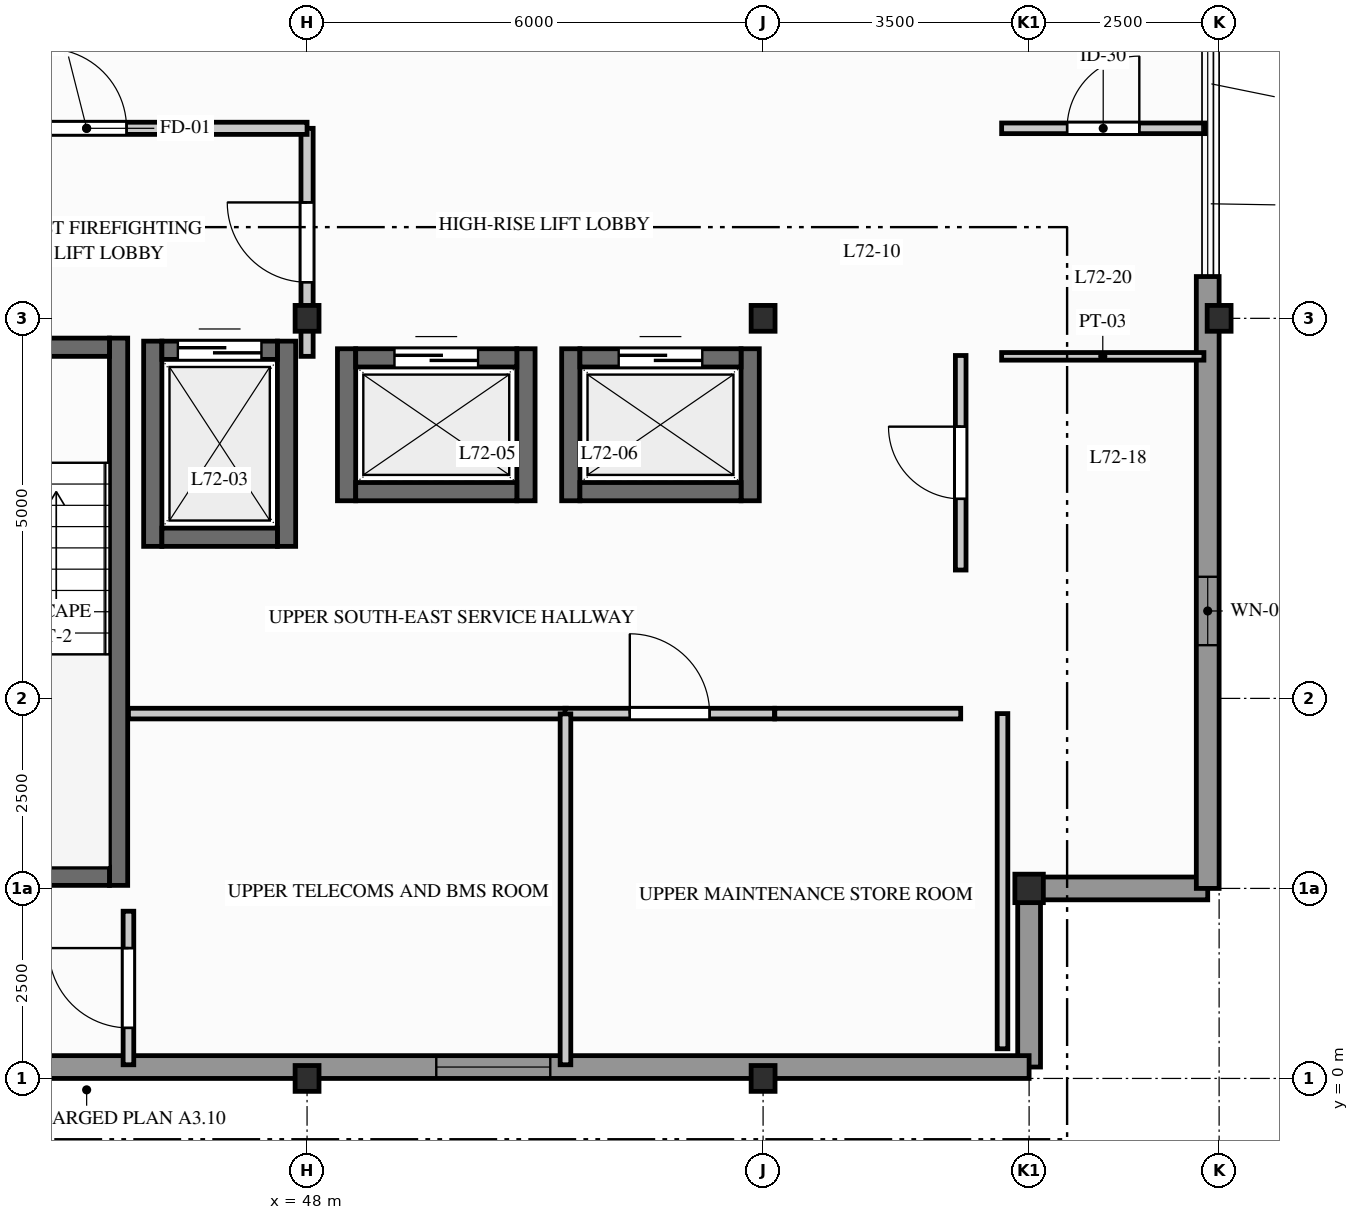
"""IFC4 building model, lengths in metres.
Left out: names, types, materials, properties, quantities, classifications, styles, units other than length and angle.
Written with IfcOpenShell. Run it as: python <this file> out.ifc"""

import sys

from ifc_helpers import new_model, si_unit, direction, frame, frame_2d, origin, origin_2d, place, context, subcontext, project, spatial, rectangle, i_section, extrude, element, fill, save


model = new_model("IFC4")
c1 = context("Model", 3, precision=1e-05, world=origin(), true_north=direction((0.0, 1.0)))
c2 = subcontext(c1, "Body", "Model", "MODEL_VIEW")
j1 = project(units=[si_unit("LENGTHUNIT", "METRE"), si_unit("PLANEANGLEUNIT", "RADIAN")], contexts=[c1])
p1 = place(None, origin())
s1 = spatial("IfcSite", under=j1, at=p1, CompositionType="ELEMENT")
p2 = place(p1, origin())
s2 = spatial("IfcBuilding", under=s1, at=p2, CompositionType="ELEMENT")
p3 = place(p2, frame((0.0, 0.0, 236.6)))
s3 = spatial("IfcBuildingStorey", under=s2, at=p3, CompositionType="ELEMENT", Elevation=236.6)
for number, where, z_axis, x_axis in (
    (1, (48.0, 0.0, 0.0), (0.0, 0.0, 1.0), (1.0, 0.0, 0.0)),
    (2, (48.0, 10.0, 0.0), (0.0, 0.0, 1.0), (1.0, 0.0, 0.0)),
    (3, (54.0, 0.0, 0.0), (0.0, 0.0, 1.0), (1.0, 0.0, 0.0)),
    (4, (54.0, 10.0, 0.0), (0.0, 0.0, 1.0), (1.0, 0.0, 0.0)),
):
    element("IfcColumn", number, at=place(p3, frame(where, z_axis=z_axis, x_axis=x_axis)), inside=s3, PredefinedType="COLUMN", context=c2, shape_type="SweptSolid", body=[
        extrude(i_section(OverallWidth=0.314, OverallDepth=0.34, WebThickness=0.019, FlangeThickness=0.031, FilletRadius=0.015, at=origin_2d()), origin(), (0.0, 0.0, 1.0), 3.45),
    ])
p4 = place(p3, frame((57.5, 2.5, 0.0), z_axis=(0.0, 0.0, 1.0), x_axis=(1.0, 0.0, 0.0)))
e5 = element("IfcColumn", 5, at=p4, inside=s3, PredefinedType="COLUMN", context=c2, shape_type="SweptSolid", body=[
    extrude(i_section(OverallWidth=0.375, OverallDepth=0.375, WebThickness=0.017, FlangeThickness=0.027, FilletRadius=0.015, at=origin_2d()), origin(), (0.0, 0.0, 1.0), 3.45),
])
p5 = place(p3, frame((60.0, 10.0, 0.0), z_axis=(0.0, 0.0, 1.0), x_axis=(1.0, 0.0, 0.0)))
e6 = element("IfcColumn", 6, at=p5, inside=s3, PredefinedType="COLUMN", context=c2, shape_type="SweptSolid", body=[
    extrude(i_section(OverallWidth=0.314, OverallDepth=0.34, WebThickness=0.019, FlangeThickness=0.031, FilletRadius=0.015, at=origin_2d()), origin(), (0.0, 0.0, 1.0), 3.45),
])
for number, where, z_axis, x_axis in (
    (7, (57.5, 0.15, 0.0), (0.0, 0.0, 1.0), (0.0, 1.0, 0.0)),
    (8, (57.5, 2.5, 0.0), (0.0, 0.0, 1.0), (1.0, 0.0, 0.0)),
):
    element("IfcWall", number, at=place(p3, frame(where, z_axis=z_axis, x_axis=x_axis)), inside=s3, PredefinedType="STANDARD", context=c2, shape_type="SweptSolid", body=[
        extrude(rectangle(XDim=2.35, YDim=0.3, at=frame_2d((1.175, 0.0))), origin(), (0.0, 0.0, 1.0), 3.2),
    ])
p6 = place(p3, frame((29.75, 0.15, 0.0), z_axis=(0.0, 0.0, 1.0), x_axis=(1.0, 0.0, 0.0)))
e9 = element("IfcWall", 9, at=p6, inside=s3, PredefinedType="STANDARD", context=c2, shape_type="SweptSolid", body=[
    extrude(rectangle(XDim=27.75, YDim=0.3, at=frame_2d((13.875, 0.0))), origin(), (0.0, 0.0, 1.0), 2.635),
])
p7 = place(p6, frame((2.5, 0.0, 1.016)))
e10 = element("IfcOpeningElement", 10, at=p7, cuts=e9, PredefinedType="OPENING", context=c2, shape_type="SweptSolid", body=[
    extrude(rectangle(XDim=0.8, YDim=1.4, at=frame_2d((0.4, 0.7))), frame((0.0, 0.16, 0.0), z_axis=(0.0, -1.0, 0.0), x_axis=(1.0, 0.0, 0.0)), (0.0, 0.0, 1.0), 0.32),
])
p8 = place(p6, frame((19.95, 0.0, 0.616)))
e11 = element("IfcOpeningElement", 11, at=p8, cuts=e9, PredefinedType="OPENING", context=c2, shape_type="SweptSolid", body=[
    extrude(rectangle(XDim=1.5, YDim=1.8, at=frame_2d((0.75, 0.9))), frame((0.0, 0.16, 0.0), z_axis=(0.0, -1.0, 0.0), x_axis=(1.0, 0.0, 0.0)), (0.0, 0.0, 1.0), 0.32),
])
p9 = place(p3, frame((59.85, 2.5, 0.0), z_axis=(0.0, 0.0, 1.0), x_axis=(0.0, 1.0, 0.0)))
e12 = element("IfcWall", 12, at=p9, inside=s3, PredefinedType="STANDARD", context=c2, shape_type="SweptSolid", body=[
    extrude(rectangle(XDim=8.05, YDim=0.3, at=frame_2d((4.025, 0.0))), origin(), (0.0, 0.0, 1.0), 3.2),
])
p10 = place(p9, frame((3.2, 0.0, 1.2)))
e13 = element("IfcOpeningElement", 13, at=p10, cuts=e12, PredefinedType="OPENING", context=c2, shape_type="SweptSolid", body=[
    extrude(rectangle(XDim=0.9, YDim=0.9, at=frame_2d((0.45, 0.45))), frame((0.0, 0.16, 0.0), z_axis=(0.0, -1.0, 0.0), x_axis=(1.0, 0.0, 0.0)), (0.0, 0.0, 1.0), 0.32),
])
p11 = place(p3, frame((45.52, 2.54, 0.0), z_axis=(0.0, 0.0, 1.0), x_axis=(0.0, 1.0, 0.0)))
e14 = element("IfcWall", 14, at=p11, inside=s3, PredefinedType="SHEAR", context=c2, shape_type="SweptSolid", body=[
    extrude(rectangle(XDim=7.2, YDim=0.24, at=frame_2d((3.6, 0.0))), origin(), (0.0, 0.0, 1.0), 3.2),
])
p12 = place(p3, frame((42.45, 2.66, 0.0), z_axis=(0.0, 0.0, 1.0), x_axis=(1.0, 0.0, 0.0)))
e15 = element("IfcWall", 15, at=p12, inside=s3, PredefinedType="SHEAR", context=c2, shape_type="SweptSolid", body=[
    extrude(rectangle(XDim=2.95, YDim=0.24, at=frame_2d((1.475, 0.0))), origin(), (0.0, 0.0, 1.0), 3.2),
])
p13 = place(p3, frame((45.4, 9.62, 0.0), z_axis=(0.0, 0.0, 1.0), x_axis=(-1.0, 0.0, 0.0)))
e16 = element("IfcWall", 16, at=p13, inside=s3, PredefinedType="SHEAR", context=c2, shape_type="SweptSolid", body=[
    extrude(rectangle(XDim=2.95, YDim=0.24, at=frame_2d((1.475, 0.0))), origin(), (0.0, 0.0, 1.0), 3.2),
])
p14 = place(p13, frame((0.95, 0.0, 0.0)))
e17 = element("IfcOpeningElement", 17, at=p14, cuts=e16, PredefinedType="OPENING", context=c2, shape_type="SweptSolid", body=[
    extrude(rectangle(XDim=1.05, YDim=2.06, at=frame_2d((0.525, 1.03))), frame((0.0, 0.13, 0.0), z_axis=(0.0, -1.0, 0.0), x_axis=(1.0, 0.0, 0.0)), (0.0, 0.0, 1.0), 0.26),
])
for number, where, z_axis, x_axis in (
    (18, (45.97, 7.0, 0.0), (0.0, 0.0, 1.0), (0.0, 1.0, 0.0)),
    (19, (47.73, 7.0, 0.0), (0.0, 0.0, 1.0), (0.0, 1.0, 0.0)),
):
    element("IfcWall", number, at=place(p3, frame(where, z_axis=z_axis, x_axis=x_axis)), inside=s3, PredefinedType="SHEAR", context=c2, shape_type="SweptSolid", body=[
        extrude(rectangle(XDim=2.7, YDim=0.24, at=frame_2d((1.35, 0.0))), origin(), (0.0, 0.0, 1.0), 3.2),
    ])
p15 = place(p3, frame((46.09, 7.12, 0.0), z_axis=(0.0, 0.0, 1.0), x_axis=(1.0, 0.0, 0.0)))
e20 = element("IfcWall", 20, at=p15, inside=s3, PredefinedType="SHEAR", context=c2, shape_type="SweptSolid", body=[
    extrude(rectangle(XDim=1.52, YDim=0.24, at=frame_2d((0.76, 0.0))), origin(), (0.0, 0.0, 1.0), 3.2),
])
p16 = place(p3, frame((46.09, 9.58, 0.0), z_axis=(0.0, 0.0, 1.0), x_axis=(1.0, 0.0, 0.0)))
e21 = element("IfcWall", 21, at=p16, inside=s3, PredefinedType="SHEAR", context=c2, shape_type="SweptSolid", body=[
    extrude(rectangle(XDim=1.52, YDim=0.24, at=frame_2d((0.76, 0.0))), origin(), (0.0, 0.0, 1.0), 3.2),
])
p17 = place(p16, frame((0.21, 0.0, 0.0)))
e22 = element("IfcOpeningElement", 22, at=p17, cuts=e21, PredefinedType="OPENING", context=c2, shape_type="SweptSolid", body=[
    extrude(rectangle(XDim=1.1, YDim=2.06, at=frame_2d((0.55, 1.03))), frame((0.0, 0.13, 0.0), z_axis=(0.0, -1.0, 0.0), x_axis=(1.0, 0.0, 0.0)), (0.0, 0.0, 1.0), 0.26),
])
for number, where, z_axis, x_axis in (
    (23, (48.52, 7.6, 0.0), (0.0, 0.0, 1.0), (0.0, 1.0, 0.0)),
    (24, (50.88, 7.6, 0.0), (0.0, 0.0, 1.0), (0.0, 1.0, 0.0)),
):
    element("IfcWall", number, at=place(p3, frame(where, z_axis=z_axis, x_axis=x_axis)), inside=s3, PredefinedType="SHEAR", context=c2, shape_type="SweptSolid", body=[
        extrude(rectangle(XDim=2.0, YDim=0.24, at=frame_2d((1.0, 0.0))), origin(), (0.0, 0.0, 1.0), 3.2),
    ])
p18 = place(p3, frame((48.64, 7.72, 0.0), z_axis=(0.0, 0.0, 1.0), x_axis=(1.0, 0.0, 0.0)))
e25 = element("IfcWall", 25, at=p18, inside=s3, PredefinedType="SHEAR", context=c2, shape_type="SweptSolid", body=[
    extrude(rectangle(XDim=2.12, YDim=0.24, at=frame_2d((1.06, 0.0))), origin(), (0.0, 0.0, 1.0), 3.2),
])
p19 = place(p3, frame((48.64, 9.48, 0.0), z_axis=(0.0, 0.0, 1.0), x_axis=(1.0, 0.0, 0.0)))
e26 = element("IfcWall", 26, at=p19, inside=s3, PredefinedType="SHEAR", context=c2, shape_type="SweptSolid", body=[
    extrude(rectangle(XDim=2.12, YDim=0.24, at=frame_2d((1.06, 0.0))), origin(), (0.0, 0.0, 1.0), 3.2),
])
p20 = place(p19, frame((0.51, 0.0, 0.0)))
e27 = element("IfcOpeningElement", 27, at=p20, cuts=e26, PredefinedType="OPENING", context=c2, shape_type="SweptSolid", body=[
    extrude(rectangle(XDim=1.1, YDim=2.06, at=frame_2d((0.55, 1.03))), frame((0.0, 0.13, 0.0), z_axis=(0.0, -1.0, 0.0), x_axis=(1.0, 0.0, 0.0)), (0.0, 0.0, 1.0), 0.26),
])
for number, where, z_axis, x_axis in (
    (28, (51.47, 7.6, 0.0), (0.0, 0.0, 1.0), (0.0, 1.0, 0.0)),
    (29, (53.83, 7.6, 0.0), (0.0, 0.0, 1.0), (0.0, 1.0, 0.0)),
):
    element("IfcWall", number, at=place(p3, frame(where, z_axis=z_axis, x_axis=x_axis)), inside=s3, PredefinedType="SHEAR", context=c2, shape_type="SweptSolid", body=[
        extrude(rectangle(XDim=2.0, YDim=0.24, at=frame_2d((1.0, 0.0))), origin(), (0.0, 0.0, 1.0), 3.2),
    ])
p21 = place(p3, frame((51.59, 7.72, 0.0), z_axis=(0.0, 0.0, 1.0), x_axis=(1.0, 0.0, 0.0)))
e30 = element("IfcWall", 30, at=p21, inside=s3, PredefinedType="SHEAR", context=c2, shape_type="SweptSolid", body=[
    extrude(rectangle(XDim=2.12, YDim=0.24, at=frame_2d((1.06, 0.0))), origin(), (0.0, 0.0, 1.0), 3.2),
])
p22 = place(p3, frame((51.59, 9.48, 0.0), z_axis=(0.0, 0.0, 1.0), x_axis=(1.0, 0.0, 0.0)))
e31 = element("IfcWall", 31, at=p22, inside=s3, PredefinedType="SHEAR", context=c2, shape_type="SweptSolid", body=[
    extrude(rectangle(XDim=2.12, YDim=0.24, at=frame_2d((1.06, 0.0))), origin(), (0.0, 0.0, 1.0), 3.2),
])
p23 = place(p22, frame((0.51, 0.0, 0.0)))
e32 = element("IfcOpeningElement", 32, at=p23, cuts=e31, PredefinedType="OPENING", context=c2, shape_type="SweptSolid", body=[
    extrude(rectangle(XDim=1.1, YDim=2.06, at=frame_2d((0.55, 1.03))), frame((0.0, 0.13, 0.0), z_axis=(0.0, -1.0, 0.0), x_axis=(1.0, 0.0, 0.0)), (0.0, 0.0, 1.0), 0.26),
])
p24 = place(p3, frame((45.65, 0.18, 0.0), z_axis=(0.0, 0.0, 1.0), x_axis=(0.0, 1.0, 0.0)))
e33 = element("IfcWall", 33, at=p24, inside=s3, PredefinedType="PARTITIONING", context=c2, shape_type="SweptSolid", body=[
    extrude(rectangle(XDim=2.02, YDim=0.14, at=frame_2d((1.01, 0.0))), origin(), (0.0, 0.0, 1.0), 3.2),
])
p25 = place(p24, frame((0.485, 0.0, 0.0)))
e34 = element("IfcOpeningElement", 34, at=p25, cuts=e33, PredefinedType="OPENING", context=c2, shape_type="SweptSolid", body=[
    extrude(rectangle(XDim=1.05, YDim=2.06, at=frame_2d((0.525, 1.03))), frame((0.0, 0.08, 0.0), z_axis=(0.0, -1.0, 0.0), x_axis=(1.0, 0.0, 0.0)), (0.0, 0.0, 1.0), 0.16),
])
p26 = place(p3, frame((45.65, 4.8, 0.0), z_axis=(0.0, 0.0, 1.0), x_axis=(1.0, 0.0, 0.0)))
e35 = element("IfcWall", 35, at=p26, inside=s3, PredefinedType="PARTITIONING", context=c2, shape_type="SweptSolid", body=[
    extrude(rectangle(XDim=5.761, YDim=0.14, at=frame_2d((2.881, 0.0))), origin(), (0.0, 0.0, 1.0), 2.563),
])
p27 = place(p3, frame((51.393, 4.8, 0.0), z_axis=(0.0, 0.0, 1.0), x_axis=(1.0, 0.0, 0.0)))
e36 = element("IfcWall", 36, at=p27, inside=s3, PredefinedType="PARTITIONING", context=c2, shape_type="SweptSolid", body=[
    extrude(rectangle(XDim=2.757, YDim=0.14, at=frame_2d((1.379, 0.0))), origin(), (0.0, 0.0, 1.0), 2.563),
])
p28 = place(p27, frame((0.854, 0.0, 0.0)))
e37 = element("IfcOpeningElement", 37, at=p28, cuts=e36, PredefinedType="OPENING", context=c2, shape_type="SweptSolid", body=[
    extrude(rectangle(XDim=1.05, YDim=2.06, at=frame_2d((0.525, 1.03))), frame((0.0, 0.08, 0.0), z_axis=(0.0, -1.0, 0.0), x_axis=(1.0, 0.0, 0.0)), (0.0, 0.0, 1.0), 0.16),
])
p29 = place(p3, frame((54.154, 4.8, 0.0), z_axis=(0.0, 0.0, 1.0), x_axis=(1.0, 0.0, 0.0)))
e38 = element("IfcWall", 38, at=p29, inside=s3, PredefinedType="PARTITIONING", context=c2, shape_type="SweptSolid", body=[
    extrude(rectangle(XDim=2.446, YDim=0.14, at=frame_2d((1.223, 0.0))), origin(), (0.0, 0.0, 1.0), 3.2),
])
p30 = place(p3, frame((56.6, 6.689, 0.0), z_axis=(0.0, 0.0, 1.0), x_axis=(0.0, 1.0, 0.0)))
e39 = element("IfcWall", 39, at=p30, inside=s3, PredefinedType="PARTITIONING", context=c2, shape_type="SweptSolid", body=[
    extrude(rectangle(XDim=2.823, YDim=0.14, at=frame_2d((1.411, 0.0))), origin(), (0.0, 0.0, 1.0), 3.2),
])
p31 = place(p30, frame((0.936, 0.0, 0.0)))
e40 = element("IfcOpeningElement", 40, at=p31, cuts=e39, PredefinedType="OPENING", context=c2, shape_type="SweptSolid", body=[
    extrude(rectangle(XDim=0.95, YDim=2.05, at=frame_2d((0.475, 1.025))), frame((0.0, 0.08, 0.0), z_axis=(0.0, -1.0, 0.0), x_axis=(1.0, 0.0, 0.0)), (0.0, 0.0, 1.0), 0.16),
])
p32 = place(p3, frame((51.4, 0.18, 0.0), z_axis=(0.0, 0.0, 1.0), x_axis=(0.0, 1.0, 0.0)))
e41 = element("IfcWall", 41, at=p32, inside=s3, PredefinedType="PARTITIONING", context=c2, shape_type="SweptSolid", body=[
    extrude(rectangle(XDim=4.616, YDim=0.14, at=frame_2d((2.308, 0.0))), origin(), (0.0, 0.0, 1.0), 3.2),
])
p33 = place(p3, frame((48.0, 9.5, 0.0), z_axis=(0.0, 0.0, 1.0), x_axis=(0.0, 1.0, 0.0)))
e42 = element("IfcWall", 42, at=p33, inside=s3, PredefinedType="PARTITIONING", context=c2, shape_type="SweptSolid", body=[
    extrude(rectangle(XDim=3.0, YDim=0.16, at=frame_2d((1.5, 0.0))), origin(), (0.0, 0.0, 1.0), 2.563),
])
p34 = place(p33, frame((0.975, 0.0, 0.0)))
e43 = element("IfcOpeningElement", 43, at=p34, cuts=e42, PredefinedType="OPENING", context=c2, shape_type="SweptSolid", body=[
    extrude(rectangle(XDim=1.05, YDim=2.06, at=frame_2d((0.525, 1.03))), frame((0.0, 0.09, 0.0), z_axis=(0.0, -1.0, 0.0), x_axis=(1.0, 0.0, 0.0)), (0.0, 0.0, 1.0), 0.18),
])
p35 = place(p3, frame((42.2, 12.5, 0.0), z_axis=(0.0, 0.0, 1.0), x_axis=(1.0, 0.0, 0.0)))
e44 = element("IfcWall", 44, at=p35, inside=s3, PredefinedType="PARTITIONING", context=c2, shape_type="SweptSolid", body=[
    extrude(rectangle(XDim=5.8, YDim=0.16, at=frame_2d((2.9, 0.0))), origin(), (0.0, 0.0, 1.0), 2.563),
])
p36 = place(p35, frame((2.375, 0.0, 0.0)))
e45 = element("IfcOpeningElement", 45, at=p36, cuts=e44, PredefinedType="OPENING", context=c2, shape_type="SweptSolid", body=[
    extrude(rectangle(XDim=1.05, YDim=2.06, at=frame_2d((0.525, 1.03))), frame((0.0, 0.09, 0.0), z_axis=(0.0, -1.0, 0.0), x_axis=(1.0, 0.0, 0.0)), (0.0, 0.0, 1.0), 0.18),
])
p37 = place(p3, frame((57.139, 9.5, 0.0), z_axis=(0.0, 0.0, 1.0), x_axis=(1.0, 0.0, 0.0)))
e46 = element("IfcWall", 46, at=p37, inside=s3, PredefinedType="PARTITIONING", context=c2, shape_type="SweptSolid", body=[
    extrude(rectangle(XDim=2.661, YDim=0.1, at=frame_2d((1.331, 0.0))), origin(), (0.0, 0.0, 1.0), 3.2),
])
p38 = place(p3, frame((57.139, 12.5, 0.0), z_axis=(0.0, 0.0, 1.0), x_axis=(1.0, 0.0, 0.0)))
e47 = element("IfcWall", 47, at=p38, inside=s3, PredefinedType="PARTITIONING", context=c2, shape_type="SweptSolid", body=[
    extrude(rectangle(XDim=2.673, YDim=0.14, at=frame_2d((1.336, 0.0))), origin(), (0.0, 0.0, 1.0), 3.2),
])
p39 = place(p38, frame((0.861, 0.0, 0.0)))
e48 = element("IfcOpeningElement", 48, at=p39, cuts=e47, PredefinedType="OPENING", context=c2, shape_type="SweptSolid", body=[
    extrude(rectangle(XDim=0.95, YDim=2.05, at=frame_2d((0.475, 1.025))), frame((0.0, 0.08, 0.0), z_axis=(0.0, -1.0, 0.0), x_axis=(1.0, 0.0, 0.0)), (0.0, 0.0, 1.0), 0.16),
])
p40 = place(p3, frame((57.15, 0.39, 0.0), z_axis=(0.0, 0.0, 1.0), x_axis=(0.0, 1.0, 0.0)))
e49 = element("IfcWall", 49, at=p40, inside=s3, PredefinedType="PARTITIONING", context=c2, shape_type="SweptSolid", body=[
    extrude(rectangle(XDim=4.41, YDim=0.14, at=frame_2d((2.205, 0.0))), origin(), (0.0, 0.0, 1.0), 3.2),
])
p41 = place(p8, origin())
e50 = element("IfcWindow", 50, at=p41, inside=s3, PartitioningType="SINGLE_PANEL", PredefinedType="WINDOW", context=c2, shape_type="SweptSolid", body=[
    extrude(rectangle(XDim=1.5, YDim=1.8, at=frame_2d((0.75, 0.9))), frame((0.0, 0.03, 0.0), z_axis=(0.0, -1.0, 0.0), x_axis=(1.0, 0.0, 0.0)), (0.0, 0.0, 1.0), 0.06),
])
fill(e11, e50)
p42 = place(p10, origin())
e51 = element("IfcWindow", 51, at=p42, inside=s3, PartitioningType="SINGLE_PANEL", PredefinedType="WINDOW", context=c2, shape_type="SweptSolid", body=[
    extrude(rectangle(XDim=0.9, YDim=0.9, at=frame_2d((0.45, 0.45))), frame((0.0, 0.03, 0.0), z_axis=(0.0, -1.0, 0.0), x_axis=(1.0, 0.0, 0.0)), (0.0, 0.0, 1.0), 0.06),
])
fill(e13, e51)
p43 = place(p17, origin())
e52 = element("IfcDoor", 52, at=p43, inside=s3, OperationType="SLIDING_TO_LEFT", PredefinedType="DOOR", context=c2, shape_type="SweptSolid", body=[
    extrude(rectangle(XDim=1.1, YDim=2.06, at=frame_2d((0.55, 1.03))), frame((0.0, 0.025, 0.0), z_axis=(0.0, -1.0, 0.0), x_axis=(1.0, 0.0, 0.0)), (0.0, 0.0, 1.0), 0.05),
])
fill(e22, e52)
p44 = place(p20, origin())
e53 = element("IfcDoor", 53, at=p44, inside=s3, OperationType="SLIDING_TO_LEFT", PredefinedType="DOOR", context=c2, shape_type="SweptSolid", body=[
    extrude(rectangle(XDim=1.1, YDim=2.06, at=frame_2d((0.55, 1.03))), frame((0.0, 0.025, 0.0), z_axis=(0.0, -1.0, 0.0), x_axis=(1.0, 0.0, 0.0)), (0.0, 0.0, 1.0), 0.05),
])
fill(e27, e53)
p45 = place(p23, origin())
e54 = element("IfcDoor", 54, at=p45, inside=s3, OperationType="SLIDING_TO_RIGHT", PredefinedType="DOOR", context=c2, shape_type="SweptSolid", body=[
    extrude(rectangle(XDim=1.1, YDim=2.06, at=frame_2d((0.55, 1.03))), frame((0.0, 0.025, 0.0), z_axis=(0.0, -1.0, 0.0), x_axis=(1.0, 0.0, 0.0)), (0.0, 0.0, 1.0), 0.05),
])
fill(e32, e54)
p46 = place(p25, origin())
e55 = element("IfcDoor", 55, at=p46, inside=s3, OperationType="SINGLE_SWING_RIGHT", PredefinedType="DOOR", context=c2, shape_type="SweptSolid", body=[
    extrude(rectangle(XDim=1.05, YDim=2.06, at=frame_2d((0.525, 1.03))), frame((0.0, 0.025, 0.0), z_axis=(0.0, -1.0, 0.0), x_axis=(1.0, 0.0, 0.0)), (0.0, 0.0, 1.0), 0.05),
])
fill(e34, e55)
p47 = place(p28, origin())
e56 = element("IfcDoor", 56, at=p47, inside=s3, OperationType="SINGLE_SWING_LEFT", PredefinedType="DOOR", context=c2, shape_type="SweptSolid", body=[
    extrude(rectangle(XDim=1.05, YDim=2.06, at=frame_2d((0.525, 1.03))), frame((0.0, 0.025, 0.0), z_axis=(0.0, -1.0, 0.0), x_axis=(1.0, 0.0, 0.0)), (0.0, 0.0, 1.0), 0.05),
])
fill(e37, e56)
p48 = place(p31, origin())
e57 = element("IfcDoor", 57, at=p48, inside=s3, OperationType="SINGLE_SWING_RIGHT", PredefinedType="DOOR", context=c2, shape_type="SweptSolid", body=[
    extrude(rectangle(XDim=0.95, YDim=2.05, at=frame_2d((0.475, 1.025))), frame((0.0, 0.025, 0.0), z_axis=(0.0, -1.0, 0.0), x_axis=(1.0, 0.0, 0.0)), (0.0, 0.0, 1.0), 0.05),
])
fill(e40, e57)
p49 = place(p34, origin())
e58 = element("IfcDoor", 58, at=p49, inside=s3, OperationType="SINGLE_SWING_RIGHT", PredefinedType="DOOR", context=c2, shape_type="SweptSolid", body=[
    extrude(rectangle(XDim=1.05, YDim=2.06, at=frame_2d((0.525, 1.03))), frame((0.0, 0.025, 0.0), z_axis=(0.0, -1.0, 0.0), x_axis=(1.0, 0.0, 0.0)), (0.0, 0.0, 1.0), 0.05),
])
fill(e43, e58)
p50 = place(p36, origin())
e59 = element("IfcDoor", 59, at=p50, inside=s3, OperationType="SINGLE_SWING_LEFT", PredefinedType="DOOR", context=c2, shape_type="SweptSolid", body=[
    extrude(rectangle(XDim=1.05, YDim=2.06, at=frame_2d((0.525, 1.03))), frame((0.0, 0.025, 0.0), z_axis=(0.0, -1.0, 0.0), x_axis=(1.0, 0.0, 0.0)), (0.0, 0.0, 1.0), 0.05),
])
fill(e45, e59)
p51 = place(p39, origin())
e60 = element("IfcDoor", 60, at=p51, inside=s3, OperationType="SINGLE_SWING_RIGHT", PredefinedType="DOOR", context=c2, shape_type="SweptSolid", body=[
    extrude(rectangle(XDim=0.95, YDim=2.05, at=frame_2d((0.475, 1.025))), frame((0.0, 0.025, 0.0), z_axis=(0.0, -1.0, 0.0), x_axis=(1.0, 0.0, 0.0)), (0.0, 0.0, 1.0), 0.05),
])
fill(e48, e60)
save(model, sys.argv[1])
